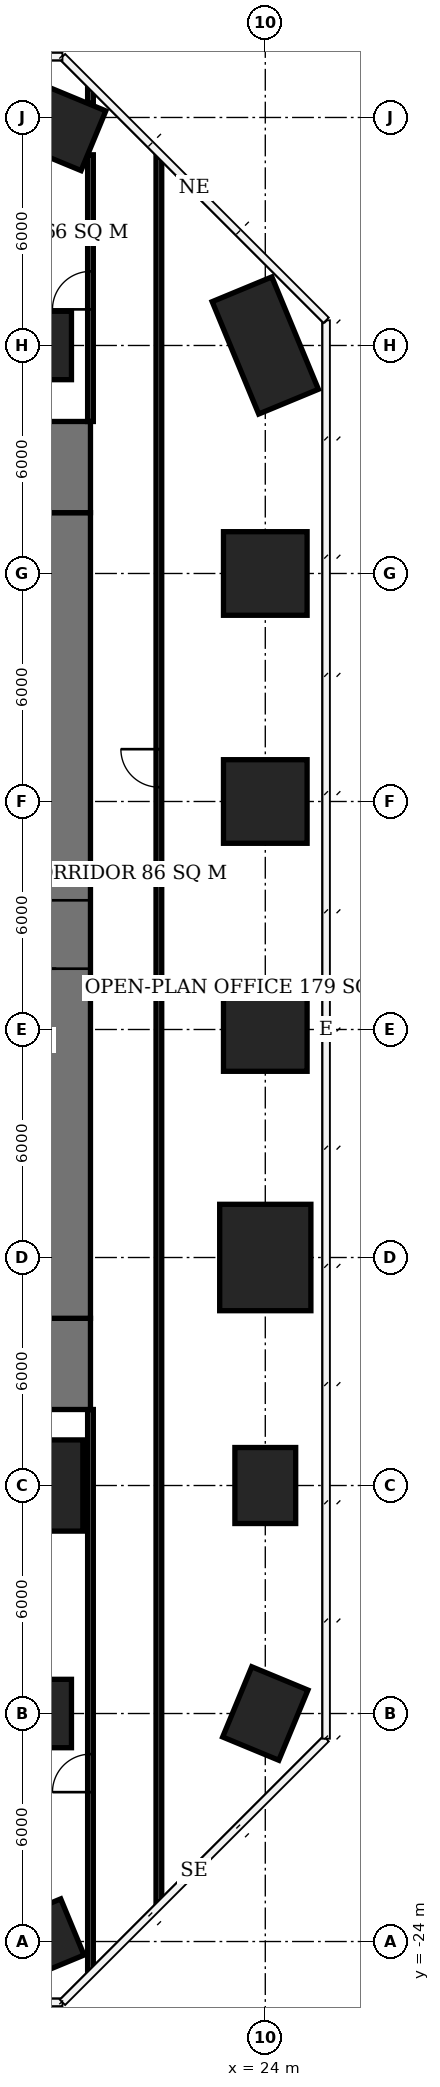
"""IFC4 building model, lengths in metres.
Left out: names, types, materials, properties, quantities, classifications, styles, units other than length and angle.
Written with IfcOpenShell. Run it as: python <this file> out.ifc"""

import sys

from ifc_helpers import new_model, si_unit, direction, frame, frame_2d, origin, origin_2d, place, context, subcontext, project, spatial, rectangle, extrude, element, fill, save


model = new_model("IFC4")
c1 = context("Model", 3, precision=1e-05, world=origin(), true_north=direction((0.0, 1.0)))
c2 = subcontext(c1, "Body", "Model", "MODEL_VIEW")
j1 = project(units=[si_unit("LENGTHUNIT", "METRE"), si_unit("PLANEANGLEUNIT", "RADIAN")], contexts=[c1])
p1 = place(None, origin())
s1 = spatial("IfcSite", under=j1, at=p1, CompositionType="ELEMENT")
p2 = place(p1, origin())
s2 = spatial("IfcBuilding", under=s1, at=p2, CompositionType="ELEMENT")
p3 = place(p2, frame((0.0, 0.0, 29.9)))
s3 = spatial("IfcBuildingStorey", under=s2, at=p3, CompositionType="ELEMENT", Elevation=29.9)
p4 = place(p3, frame((18.0, -24.0, 0.0), z_axis=(0.0, 0.0, 1.0), x_axis=(-0.923879532511, -0.382683432365, 0.0)))
e1 = element("IfcColumn", 1, at=p4, inside=s3, PredefinedType="COLUMN", context=c2, shape_type="SweptSolid", body=[
    extrude(rectangle(XDim=2.0, YDim=1.6, at=origin_2d()), origin(), (0.0, 0.0, 1.0), 3.9),
])
p5 = place(p3, frame((18.0, -18.0, 0.0), z_axis=(0.0, 0.0, 1.0), x_axis=(1.0, 0.0, 0.0)))
e2 = element("IfcColumn", 2, at=p5, inside=s3, PredefinedType="COLUMN", context=c2, shape_type="SweptSolid", body=[
    extrude(rectangle(XDim=1.8, YDim=1.8, at=origin_2d()), origin(), (0.0, 0.0, 1.0), 3.9),
])
p6 = place(p3, frame((18.0, -12.0, 0.0), z_axis=(0.0, 0.0, 1.0), x_axis=(1.0, 0.0, 0.0)))
e3 = element("IfcColumn", 3, at=p6, inside=s3, PredefinedType="COLUMN", context=c2, shape_type="SweptSolid", body=[
    extrude(rectangle(XDim=2.4, YDim=2.4, at=origin_2d()), origin(), (0.0, 0.0, 1.0), 3.9),
])
p7 = place(p3, frame((18.0, 18.0, 0.0), z_axis=(0.0, 0.0, 1.0), x_axis=(1.0, 0.0, 0.0)))
e4 = element("IfcColumn", 4, at=p7, inside=s3, PredefinedType="COLUMN", context=c2, shape_type="SweptSolid", body=[
    extrude(rectangle(XDim=1.8, YDim=1.8, at=origin_2d()), origin(), (0.0, 0.0, 1.0), 3.9),
])
p8 = place(p3, frame((18.0, 24.0, 0.0), z_axis=(0.0, 0.0, 1.0), x_axis=(0.923879532511, -0.382683432365, 0.0)))
e5 = element("IfcColumn", 5, at=p8, inside=s3, PredefinedType="COLUMN", context=c2, shape_type="SweptSolid", body=[
    extrude(rectangle(XDim=3.2, YDim=1.7, at=origin_2d()), origin(), (0.0, 0.0, 1.0), 3.9),
])
for number, where, z_axis, x_axis in (
    (6, (24.0, -18.0, 0.0), (0.0, 0.0, 1.0), (-0.383, -0.924, 0.0)),
    (7, (24.0, -12.0, 0.0), (0.0, 0.0, 1.0), (0.0, 1.0, 0.0)),
):
    element("IfcColumn", number, at=place(p3, frame(where, z_axis=z_axis, x_axis=x_axis)), inside=s3, PredefinedType="COLUMN", context=c2, shape_type="SweptSolid", body=[
        extrude(rectangle(XDim=2.0, YDim=1.6, at=origin_2d()), origin(), (0.0, 0.0, 1.0), 3.9),
    ])
p9 = place(p3, frame((24.0, -6.0, 0.0), z_axis=(0.0, 0.0, 1.0), x_axis=(0.0, 1.0, 0.0)))
e8 = element("IfcColumn", 8, at=p9, inside=s3, PredefinedType="COLUMN", context=c2, shape_type="SweptSolid", body=[
    extrude(rectangle(XDim=2.8, YDim=2.4, at=origin_2d()), origin(), (0.0, 0.0, 1.0), 3.9),
])
for number, where, z_axis, x_axis in (
    (9, (24.0, 0.0, 0.0), (0.0, 0.0, 1.0), (1.0, 0.0, 0.0)),
    (10, (24.0, 6.0, 0.0), (0.0, 0.0, 1.0), (1.0, 0.0, 0.0)),
    (11, (24.0, 12.0, 0.0), (0.0, 0.0, 1.0), (1.0, 0.0, 0.0)),
):
    element("IfcColumn", number, at=place(p3, frame(where, z_axis=z_axis, x_axis=x_axis)), inside=s3, PredefinedType="COLUMN", context=c2, shape_type="SweptSolid", body=[
        extrude(rectangle(XDim=2.2, YDim=2.2, at=origin_2d()), origin(), (0.0, 0.0, 1.0), 3.9),
    ])
p10 = place(p3, frame((24.0, 18.0, 0.0), z_axis=(0.0, 0.0, 1.0), x_axis=(0.382683432365, -0.923879532511, 0.0)))
e12 = element("IfcColumn", 12, at=p10, inside=s3, PredefinedType="COLUMN", context=c2, shape_type="SweptSolid", body=[
    extrude(rectangle(XDim=3.2, YDim=1.7, at=origin_2d()), origin(), (0.0, 0.0, 1.0), 3.9),
])
p11 = place(p3, frame((18.5, -7.6, 0.0), z_axis=(0.0, 0.0, 1.0), x_axis=(0.0, 1.0, 0.0)))
e13 = element("IfcWall", 13, at=p11, inside=s3, PredefinedType="SHEAR", context=c2, shape_type="SweptSolid", body=[
    extrude(rectangle(XDim=21.2, YDim=1.8, at=frame_2d((10.6, 0.0))), origin(), (0.0, 0.0, 1.0), 3.9),
])
p12 = place(p11, frame((9.2, 0.0, 0.0)))
e14 = element("IfcOpeningElement", 14, at=p12, cuts=e13, PredefinedType="OPENING", context=c2, shape_type="SweptSolid", body=[
    extrude(rectangle(XDim=1.8, YDim=2.4, at=frame_2d((0.9, 1.2))), frame((0.0, 0.91, 0.0), z_axis=(0.0, -1.0, 0.0), x_axis=(1.0, 0.0, 0.0)), (0.0, 0.0, 1.0), 1.82),
])
for number, where, z_axis, x_axis in (
    (15, (18.5, -10.0, 0.0), (0.0, 0.0, 1.0), (0.0, 1.0, 0.0)),
    (16, (18.5, 13.6, 0.0), (0.0, 0.0, 1.0), (0.0, 1.0, 0.0)),
):
    element("IfcWall", number, at=place(p3, frame(where, z_axis=z_axis, x_axis=x_axis)), inside=s3, PredefinedType="SHEAR", context=c2, shape_type="SweptSolid", body=[
        extrude(rectangle(XDim=2.4, YDim=1.8, at=frame_2d((1.2, 0.0))), origin(), (0.0, 0.0, 1.0), 3.9),
    ])
p13 = place(p3, frame((19.4, -24.771, 0.0), z_axis=(0.0, 0.0, 1.0), x_axis=(0.0, 1.0, 0.0)))
e17 = element("IfcWall", 17, at=p13, inside=s3, PredefinedType="PARTITIONING", context=c2, shape_type="SweptSolid", body=[
    extrude(rectangle(XDim=14.771, YDim=0.15, at=frame_2d((7.385, 0.0))), origin(), (0.0, 0.0, 1.0), 3.65),
])
p14 = place(p13, frame((4.702, 0.0, 0.0)))
e18 = element("IfcOpeningElement", 18, at=p14, cuts=e17, PredefinedType="OPENING", context=c2, shape_type="SweptSolid", body=[
    extrude(rectangle(XDim=1.0, YDim=2.1, at=frame_2d((0.5, 1.05))), frame((0.0, 0.085, 0.0), z_axis=(0.0, -1.0, 0.0), x_axis=(1.0, 0.0, 0.0)), (0.0, 0.0, 1.0), 0.17),
])
p15 = place(p3, frame((19.4, 16.0, 0.0), z_axis=(0.0, 0.0, 1.0), x_axis=(0.0, 1.0, 0.0)))
e19 = element("IfcWall", 19, at=p15, inside=s3, PredefinedType="PARTITIONING", context=c2, shape_type="SweptSolid", body=[
    extrude(rectangle(XDim=7.018, YDim=0.15, at=frame_2d((3.509, 0.0))), origin(), (0.0, 0.0, 1.0), 3.65),
])
p16 = place(p15, frame((2.95, 0.0, 0.0)))
e20 = element("IfcOpeningElement", 20, at=p16, cuts=e19, PredefinedType="OPENING", context=c2, shape_type="SweptSolid", body=[
    extrude(rectangle(XDim=1.0, YDim=2.1, at=frame_2d((0.5, 1.05))), frame((0.0, 0.085, 0.0), z_axis=(0.0, -1.0, 0.0), x_axis=(1.0, 0.0, 0.0)), (0.0, 0.0, 1.0), 0.17),
])
p17 = place(p3, frame((19.4, 24.371, 0.0), z_axis=(0.0, 0.0, 1.0), x_axis=(0.0, 1.0, 0.0)))
e21 = element("IfcWall", 21, at=p17, inside=s3, PredefinedType="PARTITIONING", context=c2, shape_type="SweptSolid", body=[
    extrude(rectangle(XDim=0.4, YDim=0.15, at=frame_2d((0.2, 0.0))), origin(), (0.0, 0.0, 1.0), 3.65),
])
p18 = place(p3, frame((21.2, -22.971, 0.0), z_axis=(0.0, 0.0, 1.0), x_axis=(0.0, 1.0, 0.0)))
e22 = element("IfcWall", 22, at=p18, inside=s3, PredefinedType="PARTITIONING", context=c2, shape_type="SweptSolid", body=[
    extrude(rectangle(XDim=45.942, YDim=0.15, at=frame_2d((22.971, 0.0))), origin(), (0.0, 0.0, 1.0), 3.65),
])
p19 = place(p18, frame((29.348, 0.0, 0.0)))
e23 = element("IfcOpeningElement", 23, at=p19, cuts=e22, PredefinedType="OPENING", context=c2, shape_type="SweptSolid", body=[
    extrude(rectangle(XDim=1.0, YDim=2.1, at=frame_2d((0.5, 1.05))), frame((0.0, 0.085, 0.0), z_axis=(0.0, -1.0, 0.0), x_axis=(1.0, 0.0, 0.0)), (0.0, 0.0, 1.0), 0.17),
])
p20 = place(p12, origin())
e24 = element("IfcDoor", 24, at=p20, inside=s3, OperationType="DOUBLE_DOOR_SINGLE_SWING", PredefinedType="DOOR", context=c2, shape_type="SweptSolid", body=[
    extrude(rectangle(XDim=1.8, YDim=2.4, at=frame_2d((0.9, 1.2))), frame((0.0, 0.025, 0.0), z_axis=(0.0, -1.0, 0.0), x_axis=(1.0, 0.0, 0.0)), (0.0, 0.0, 1.0), 0.05),
])
fill(e14, e24)
p21 = place(p14, origin())
e25 = element("IfcDoor", 25, at=p21, inside=s3, OperationType="SINGLE_SWING_LEFT", PredefinedType="DOOR", context=c2, shape_type="SweptSolid", body=[
    extrude(rectangle(XDim=1.0, YDim=2.1, at=frame_2d((0.5, 1.05))), frame((0.0, 0.025, 0.0), z_axis=(0.0, -1.0, 0.0), x_axis=(1.0, 0.0, 0.0)), (0.0, 0.0, 1.0), 0.05),
])
fill(e18, e25)
p22 = place(p19, origin())
e26 = element("IfcDoor", 26, at=p22, inside=s3, OperationType="SINGLE_SWING_RIGHT", PredefinedType="DOOR", context=c2, shape_type="SweptSolid", body=[
    extrude(rectangle(XDim=1.0, YDim=2.1, at=frame_2d((0.5, 1.05))), frame((0.0, 0.025, 0.0), z_axis=(0.0, -1.0, 0.0), x_axis=(1.0, 0.0, 0.0)), (0.0, 0.0, 1.0), 0.05),
])
fill(e23, e26)
p23 = place(p16, origin())
e27 = element("IfcDoor", 27, at=p23, inside=s3, OperationType="SINGLE_SWING_LEFT", PredefinedType="DOOR", context=c2, shape_type="SweptSolid", body=[
    extrude(rectangle(XDim=1.0, YDim=2.1, at=frame_2d((0.5, 1.05))), frame((0.0, 0.025, 0.0), z_axis=(0.0, -1.0, 0.0), x_axis=(1.0, 0.0, 0.0)), (0.0, 0.0, 1.0), 0.05),
])
fill(e20, e27)
save(model, sys.argv[1])
